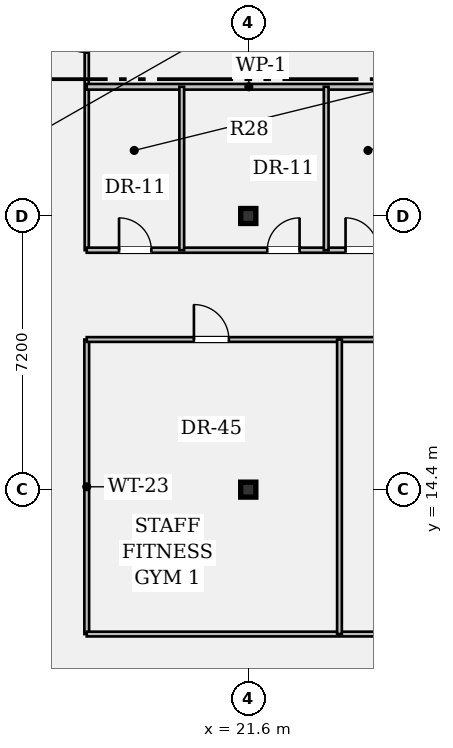
"""IFC4 building model, lengths in metres.
Left out: names, types, materials, properties, quantities, classifications, styles, units other than length and angle.
Written with IfcOpenShell. Run it as: python <this file> out.ifc"""

import sys

from ifc_helpers import new_model, si_unit, direction, frame, frame_2d, origin, origin_2d, place, context, subcontext, project, spatial, rectangle, i_section, extrude, element, fill, save


model = new_model("IFC4")
c1 = context("Model", 3, precision=1e-05, world=origin(), true_north=direction((0.0, 1.0)))
c2 = subcontext(c1, "Body", "Model", "MODEL_VIEW")
j1 = project(units=[si_unit("LENGTHUNIT", "METRE"), si_unit("PLANEANGLEUNIT", "RADIAN")], contexts=[c1])
p1 = place(None, origin())
s1 = spatial("IfcSite", under=j1, at=p1, CompositionType="ELEMENT")
p2 = place(p1, origin())
s2 = spatial("IfcBuilding", under=s1, at=p2, CompositionType="ELEMENT")
p3 = place(p2, frame((0.0, 0.0, 156.1)))
s3 = spatial("IfcBuildingStorey", under=s2, at=p3, CompositionType="ELEMENT", Elevation=156.1)
for number, where, z_axis, x_axis in (
    (1, (21.6, 14.4, 0.0), (0.0, 0.0, 1.0), (1.0, 0.0, 0.0)),
    (2, (21.6, 21.6, 0.0), (0.0, 0.0, 1.0), (1.0, 0.0, 0.0)),
):
    element("IfcColumn", number, at=place(p3, frame(where, z_axis=z_axis, x_axis=x_axis)), inside=s3, PredefinedType="COLUMN", context=c2, shape_type="SweptSolid", body=[
        extrude(i_section(OverallWidth=0.399, OverallDepth=0.394, WebThickness=0.023, FlangeThickness=0.037, FilletRadius=0.018, at=origin_2d()), origin(), (0.0, 0.0, 1.0), 3.58),
    ])
p4 = place(p3, frame((17.35, 20.7, 0.0), z_axis=(0.0, 0.0, 1.0), x_axis=(0.0, 1.0, 0.0)))
e3 = element("IfcWall", 3, at=p4, inside=s3, PredefinedType="PARTITIONING", context=c2, shape_type="SweptSolid", body=[
    extrude(rectangle(XDim=15.2, YDim=0.11, at=frame_2d((7.6, 0.0))), origin(), (0.0, 0.0, 1.0), 2.869),
])
p5 = place(p4, frame((5.2, 0.0, 0.0)))
e4 = element("IfcOpeningElement", 4, at=p5, cuts=e3, PredefinedType="OPENING", context=c2, shape_type="SweptSolid", body=[
    extrude(rectangle(XDim=0.92, YDim=2.15, at=frame_2d((0.46, 1.075))), frame((0.0, 0.067, 0.0), z_axis=(0.0, -1.0, 0.0), x_axis=(1.0, 0.0, 0.0)), (0.0, 0.0, 1.0), 0.134),
])
p6 = place(p4, frame((10.6, 0.0, 0.0)))
e5 = element("IfcOpeningElement", 5, at=p6, cuts=e3, PredefinedType="OPENING", context=c2, shape_type="SweptSolid", body=[
    extrude(rectangle(XDim=1.0, YDim=2.15, at=frame_2d((0.5, 1.075))), frame((0.0, 0.067, 0.0), z_axis=(0.0, -1.0, 0.0), x_axis=(1.0, 0.0, 0.0)), (0.0, 0.0, 1.0), 0.134),
])
p7 = place(p3, frame((17.35, 20.7, 0.0), z_axis=(0.0, 0.0, 1.0), x_axis=(1.0, 0.0, 0.0)))
e6 = element("IfcWall", 6, at=p7, inside=s3, PredefinedType="PARTITIONING", context=c2, shape_type="SweptSolid", body=[
    extrude(rectangle(XDim=21.15, YDim=0.135, at=frame_2d((10.575, 0.0))), origin(), (0.0, 0.0, 1.0), 2.869),
])
p8 = place(p7, frame((0.85, 0.0, 0.0)))
e7 = element("IfcOpeningElement", 7, at=p8, cuts=e6, PredefinedType="OPENING", context=c2, shape_type="SweptSolid", body=[
    extrude(rectangle(XDim=0.85, YDim=2.15, at=frame_2d((0.425, 1.075))), frame((0.0, 0.08, 0.0), z_axis=(0.0, -1.0, 0.0), x_axis=(1.0, 0.0, 0.0)), (0.0, 0.0, 1.0), 0.159),
])
p9 = place(p7, frame((4.75, 0.0, 0.0)))
e8 = element("IfcOpeningElement", 8, at=p9, cuts=e6, PredefinedType="OPENING", context=c2, shape_type="SweptSolid", body=[
    extrude(rectangle(XDim=0.85, YDim=2.15, at=frame_2d((0.425, 1.075))), frame((0.0, 0.08, 0.0), z_axis=(0.0, -1.0, 0.0), x_axis=(1.0, 0.0, 0.0)), (0.0, 0.0, 1.0), 0.159),
])
p10 = place(p7, frame((6.81, 0.0, 0.0)))
e9 = element("IfcOpeningElement", 9, at=p10, cuts=e6, PredefinedType="OPENING", context=c2, shape_type="SweptSolid", body=[
    extrude(rectangle(XDim=0.85, YDim=2.15, at=frame_2d((0.425, 1.075))), frame((0.0, 0.08, 0.0), z_axis=(0.0, -1.0, 0.0), x_axis=(1.0, 0.0, 0.0)), (0.0, 0.0, 1.0), 0.159),
])
p11 = place(p7, frame((9.21, 0.0, 0.0)))
e10 = element("IfcOpeningElement", 10, at=p11, cuts=e6, PredefinedType="OPENING", context=c2, shape_type="SweptSolid", body=[
    extrude(rectangle(XDim=0.92, YDim=2.15, at=frame_2d((0.46, 1.075))), frame((0.0, 0.08, 0.0), z_axis=(0.0, -1.0, 0.0), x_axis=(1.0, 0.0, 0.0)), (0.0, 0.0, 1.0), 0.159),
])
p12 = place(p3, frame((17.35, 10.6, 0.0), z_axis=(0.0, 0.0, 1.0), x_axis=(0.0, 1.0, 0.0)))
e11 = element("IfcWall", 11, at=p12, inside=s3, PredefinedType="PARTITIONING", context=c2, shape_type="SweptSolid", body=[
    extrude(rectangle(XDim=7.75, YDim=0.125, at=frame_2d((3.875, 0.0))), origin(), (0.0, 0.0, 1.0), 2.869),
])
p13 = place(p3, frame((17.35, 10.6, 0.0), z_axis=(0.0, 0.0, 1.0), x_axis=(1.0, 0.0, 0.0)))
e12 = element("IfcWall", 12, at=p13, inside=s3, PredefinedType="PARTITIONING", context=c2, shape_type="SweptSolid", body=[
    extrude(rectangle(XDim=18.8, YDim=0.125, at=frame_2d((9.4, 0.0))), origin(), (0.0, 0.0, 1.0), 2.869),
])
p14 = place(p3, frame((17.35, 18.35, 0.0), z_axis=(0.0, 0.0, 1.0), x_axis=(1.0, 0.0, 0.0)))
e13 = element("IfcWall", 13, at=p14, inside=s3, PredefinedType="PARTITIONING", context=c2, shape_type="SweptSolid", body=[
    extrude(rectangle(XDim=18.8, YDim=0.125, at=frame_2d((9.4, 0.0))), origin(), (0.0, 0.0, 1.0), 2.869),
])
p15 = place(p14, frame((2.82, 0.0, 0.0)))
e14 = element("IfcOpeningElement", 14, at=p15, cuts=e13, PredefinedType="OPENING", context=c2, shape_type="SweptSolid", body=[
    extrude(rectangle(XDim=0.92, YDim=2.15, at=frame_2d((0.46, 1.075))), frame((0.0, 0.074, 0.0), z_axis=(0.0, -1.0, 0.0), x_axis=(1.0, 0.0, 0.0)), (0.0, 0.0, 1.0), 0.149),
])
p16 = place(p14, frame((9.75, 0.0, 0.0)))
e15 = element("IfcOpeningElement", 15, at=p16, cuts=e13, PredefinedType="OPENING", context=c2, shape_type="SweptSolid", body=[
    extrude(rectangle(XDim=0.92, YDim=2.15, at=frame_2d((0.46, 1.075))), frame((0.0, 0.074, 0.0), z_axis=(0.0, -1.0, 0.0), x_axis=(1.0, 0.0, 0.0)), (0.0, 0.0, 1.0), 0.149),
])
p17 = place(p14, frame((15.82, 0.0, 0.0)))
e16 = element("IfcOpeningElement", 16, at=p17, cuts=e13, PredefinedType="OPENING", context=c2, shape_type="SweptSolid", body=[
    extrude(rectangle(XDim=0.92, YDim=2.15, at=frame_2d((0.46, 1.075))), frame((0.0, 0.074, 0.0), z_axis=(0.0, -1.0, 0.0), x_axis=(1.0, 0.0, 0.0)), (0.0, 0.0, 1.0), 0.149),
])
p18 = place(p3, frame((24.0, 10.6, 0.0), z_axis=(0.0, 0.0, 1.0), x_axis=(0.0, 1.0, 0.0)))
e17 = element("IfcWall", 17, at=p18, inside=s3, PredefinedType="PARTITIONING", context=c2, shape_type="SweptSolid", body=[
    extrude(rectangle(XDim=7.75, YDim=0.125, at=frame_2d((3.875, 0.0))), origin(), (0.0, 0.0, 1.0), 2.869),
])
p19 = place(p3, frame((17.35, 25.0, 0.0), z_axis=(0.0, 0.0, 1.0), x_axis=(1.0, 0.0, 0.0)))
e18 = element("IfcWall", 18, at=p19, inside=s3, PredefinedType="PARTITIONING", context=c2, shape_type="SweptSolid", body=[
    extrude(rectangle(XDim=8.53, YDim=0.15, at=frame_2d((4.265, 0.0))), origin(), (0.0, 0.0, 1.0), 2.869),
])
for number, where, z_axis, x_axis in (
    (19, (19.85, 20.7, 0.0), (0.0, 0.0, 1.0), (0.0, 1.0, 0.0)),
    (20, (23.65, 20.7, 0.0), (0.0, 0.0, 1.0), (0.0, 1.0, 0.0)),
):
    element("IfcWall", number, at=place(p3, frame(where, z_axis=z_axis, x_axis=x_axis)), inside=s3, PredefinedType="PARTITIONING", context=c2, shape_type="SweptSolid", body=[
        extrude(rectangle(XDim=4.3, YDim=0.125, at=frame_2d((2.15, 0.0))), origin(), (0.0, 0.0, 1.0), 2.869),
    ])
p20 = place(p15, origin())
e21 = element("IfcDoor", 21, at=p20, inside=s3, OperationType="SINGLE_SWING_LEFT", PredefinedType="DOOR", context=c2, shape_type="SweptSolid", body=[
    extrude(rectangle(XDim=0.92, YDim=2.15, at=frame_2d((0.46, 1.075))), frame((0.0, 0.025, 0.0), z_axis=(0.0, -1.0, 0.0), x_axis=(1.0, 0.0, 0.0)), (0.0, 0.0, 1.0), 0.05),
])
fill(e14, e21)
p21 = place(p8, origin())
e22 = element("IfcDoor", 22, at=p21, inside=s3, OperationType="SINGLE_SWING_LEFT", PredefinedType="DOOR", context=c2, shape_type="SweptSolid", body=[
    extrude(rectangle(XDim=0.85, YDim=2.15, at=frame_2d((0.425, 1.075))), frame((0.0, 0.025, 0.0), z_axis=(0.0, -1.0, 0.0), x_axis=(1.0, 0.0, 0.0)), (0.0, 0.0, 1.0), 0.05),
])
fill(e7, e22)
p22 = place(p9, origin())
e23 = element("IfcDoor", 23, at=p22, inside=s3, OperationType="SINGLE_SWING_RIGHT", PredefinedType="DOOR", context=c2, shape_type="SweptSolid", body=[
    extrude(rectangle(XDim=0.85, YDim=2.15, at=frame_2d((0.425, 1.075))), frame((0.0, 0.025, 0.0), z_axis=(0.0, -1.0, 0.0), x_axis=(1.0, 0.0, 0.0)), (0.0, 0.0, 1.0), 0.05),
])
fill(e8, e23)
p23 = place(p10, origin())
e24 = element("IfcDoor", 24, at=p23, inside=s3, OperationType="SINGLE_SWING_LEFT", PredefinedType="DOOR", context=c2, shape_type="SweptSolid", body=[
    extrude(rectangle(XDim=0.85, YDim=2.15, at=frame_2d((0.425, 1.075))), frame((0.0, 0.025, 0.0), z_axis=(0.0, -1.0, 0.0), x_axis=(1.0, 0.0, 0.0)), (0.0, 0.0, 1.0), 0.05),
])
fill(e9, e24)
save(model, sys.argv[1])
